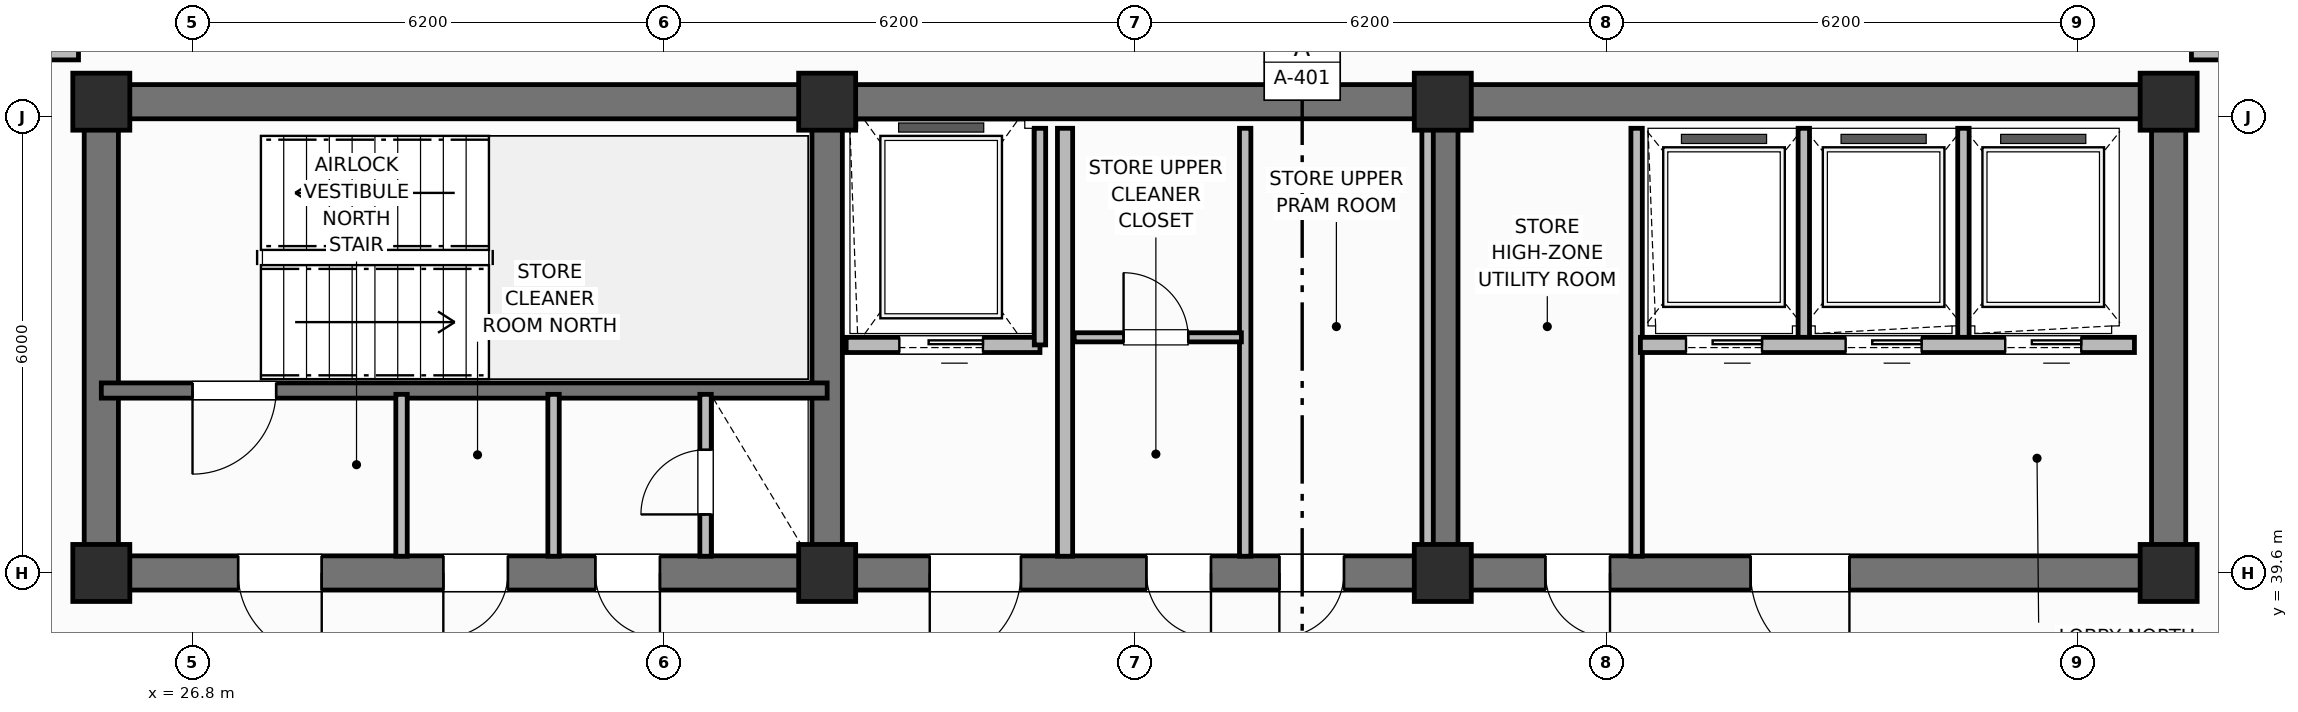
"""IFC4 building model, lengths in metres.
Left out: names, types, materials, properties, quantities, classifications, styles, units other than length and angle.
Written with IfcOpenShell. Run it as: python <this file> out.ifc"""

import sys

from ifc_helpers import new_model, si_unit, direction, frame, frame_2d, origin, origin_2d, place, context, subcontext, project, spatial, rectangle, extrude, element, fill, save


model = new_model("IFC4")
c1 = context("Model", 3, precision=1e-05, world=origin(), true_north=direction((0.0, 1.0)))
c2 = subcontext(c1, "Body", "Model", "MODEL_VIEW")
j1 = project(units=[si_unit("LENGTHUNIT", "METRE"), si_unit("PLANEANGLEUNIT", "RADIAN")], contexts=[c1])
p1 = place(None, origin())
s1 = spatial("IfcSite", under=j1, at=p1, CompositionType="ELEMENT")
p2 = place(p1, origin())
s2 = spatial("IfcBuilding", under=s1, at=p2, CompositionType="ELEMENT")
p3 = place(p2, frame((0.0, 0.0, 271.3)))
s3 = spatial("IfcBuildingStorey", under=s2, at=p3, CompositionType="ELEMENT", Elevation=271.3)
p4 = place(p3, frame((25.6, 45.8, 0.0), z_axis=(0.0, 0.0, 1.0), x_axis=(1.0, 0.0, 0.0)))
e1 = element("IfcWall", 1, at=p4, inside=s3, PredefinedType="SHEAR", context=c2, shape_type="SweptSolid", body=[
    extrude(rectangle(XDim=27.2, YDim=0.45, at=frame_2d((13.6, 0.0))), origin(), (0.0, 0.0, 1.0), 3.7),
])
for number, where, z_axis, x_axis in (
    (2, (25.6, 39.825, 0.0), (0.0, 0.0, 1.0), (0.0, 1.0, 0.0)),
    (3, (52.8, 39.825, 0.0), (0.0, 0.0, 1.0), (0.0, 1.0, 0.0)),
):
    element("IfcWall", number, at=place(p3, frame(where, z_axis=z_axis, x_axis=x_axis)), inside=s3, PredefinedType="SHEAR", context=c2, shape_type="SweptSolid", body=[
        extrude(rectangle(XDim=5.75, YDim=0.45, at=frame_2d((2.875, 0.0))), origin(), (0.0, 0.0, 1.0), 3.7),
    ])
p5 = place(p3, frame((52.8, 39.6, 0.0), z_axis=(0.0, 0.0, 1.0), x_axis=(-1.0, 0.0, 0.0)))
e4 = element("IfcWall", 4, at=p5, inside=s3, PredefinedType="SHEAR", context=c2, shape_type="SweptSolid", body=[
    extrude(rectangle(XDim=27.2, YDim=0.45, at=frame_2d((13.6, 0.0))), origin(), (0.0, 0.0, 1.0), 3.7),
])
p6 = place(p5, frame((24.3, 0.0, 0.0)))
e5 = element("IfcOpeningElement", 5, at=p6, cuts=e4, PredefinedType="OPENING", context=c2, shape_type="SweptSolid", body=[
    extrude(rectangle(XDim=1.1, YDim=2.15, at=frame_2d((0.55, 1.075))), frame((0.0, 0.235, 0.0), z_axis=(0.0, -1.0, 0.0), x_axis=(1.0, 0.0, 0.0)), (0.0, 0.0, 1.0), 0.47),
])
p7 = place(p5, frame((21.85, 0.0, 0.0)))
e6 = element("IfcOpeningElement", 6, at=p7, cuts=e4, PredefinedType="OPENING", context=c2, shape_type="SweptSolid", body=[
    extrude(rectangle(XDim=0.85, YDim=2.1, at=frame_2d((0.425, 1.05))), frame((0.0, 0.235, 0.0), z_axis=(0.0, -1.0, 0.0), x_axis=(1.0, 0.0, 0.0)), (0.0, 0.0, 1.0), 0.47),
])
p8 = place(p5, frame((19.85, 0.0, 0.0)))
e7 = element("IfcOpeningElement", 7, at=p8, cuts=e4, PredefinedType="OPENING", context=c2, shape_type="SweptSolid", body=[
    extrude(rectangle(XDim=0.85, YDim=2.1, at=frame_2d((0.425, 1.05))), frame((0.0, 0.235, 0.0), z_axis=(0.0, -1.0, 0.0), x_axis=(1.0, 0.0, 0.0)), (0.0, 0.0, 1.0), 0.47),
])
p9 = place(p5, frame((15.1, 0.0, 0.0)))
e8 = element("IfcOpeningElement", 8, at=p9, cuts=e4, PredefinedType="OPENING", context=c2, shape_type="SweptSolid", body=[
    extrude(rectangle(XDim=1.2, YDim=2.15, at=frame_2d((0.6, 1.075))), frame((0.0, 0.235, 0.0), z_axis=(0.0, -1.0, 0.0), x_axis=(1.0, 0.0, 0.0)), (0.0, 0.0, 1.0), 0.47),
])
p10 = place(p5, frame((12.6, 0.0, 0.0)))
e9 = element("IfcOpeningElement", 9, at=p10, cuts=e4, PredefinedType="OPENING", context=c2, shape_type="SweptSolid", body=[
    extrude(rectangle(XDim=0.85, YDim=2.1, at=frame_2d((0.425, 1.05))), frame((0.0, 0.235, 0.0), z_axis=(0.0, -1.0, 0.0), x_axis=(1.0, 0.0, 0.0)), (0.0, 0.0, 1.0), 0.47),
])
p11 = place(p5, frame((10.85, 0.0, 0.0)))
e10 = element("IfcOpeningElement", 10, at=p11, cuts=e4, PredefinedType="OPENING", context=c2, shape_type="SweptSolid", body=[
    extrude(rectangle(XDim=0.85, YDim=2.1, at=frame_2d((0.425, 1.05))), frame((0.0, 0.235, 0.0), z_axis=(0.0, -1.0, 0.0), x_axis=(1.0, 0.0, 0.0)), (0.0, 0.0, 1.0), 0.47),
])
p12 = place(p5, frame((7.35, 0.0, 0.0)))
e11 = element("IfcOpeningElement", 11, at=p12, cuts=e4, PredefinedType="OPENING", context=c2, shape_type="SweptSolid", body=[
    extrude(rectangle(XDim=0.85, YDim=2.1, at=frame_2d((0.425, 1.05))), frame((0.0, 0.235, 0.0), z_axis=(0.0, -1.0, 0.0), x_axis=(1.0, 0.0, 0.0)), (0.0, 0.0, 1.0), 0.47),
])
p13 = place(p5, frame((4.2, 0.0, 0.0)))
e12 = element("IfcOpeningElement", 12, at=p13, cuts=e4, PredefinedType="OPENING", context=c2, shape_type="SweptSolid", body=[
    extrude(rectangle(XDim=1.3, YDim=2.2, at=frame_2d((0.65, 1.1))), frame((0.0, 0.235, 0.0), z_axis=(0.0, -1.0, 0.0), x_axis=(1.0, 0.0, 0.0)), (0.0, 0.0, 1.0), 0.47),
])
for number, where, z_axis, x_axis in (
    (13, (35.15, 39.825, 0.0), (0.0, 0.0, 1.0), (0.0, 1.0, 0.0)),
    (14, (43.25, 39.825, 0.0), (0.0, 0.0, 1.0), (0.0, 1.0, 0.0)),
):
    element("IfcWall", number, at=place(p3, frame(where, z_axis=z_axis, x_axis=x_axis)), inside=s3, PredefinedType="SHEAR", context=c2, shape_type="SweptSolid", body=[
        extrude(rectangle(XDim=5.75, YDim=0.4, at=frame_2d((2.875, 0.0))), origin(), (0.0, 0.0, 1.0), 3.7),
    ])
for number, where, z_axis, x_axis in (
    (15, (25.6, 39.6, 0.0), (0.0, 0.0, 1.0), (1.0, 0.0, 0.0)),
    (16, (25.6, 45.8, 0.0), (0.0, 0.0, 1.0), (1.0, 0.0, 0.0)),
    (17, (35.15, 39.6, 0.0), (0.0, 0.0, 1.0), (1.0, 0.0, 0.0)),
    (18, (35.15, 45.8, 0.0), (0.0, 0.0, 1.0), (1.0, 0.0, 0.0)),
    (19, (43.25, 39.6, 0.0), (0.0, 0.0, 1.0), (1.0, 0.0, 0.0)),
    (20, (43.25, 45.8, 0.0), (0.0, 0.0, 1.0), (1.0, 0.0, 0.0)),
    (21, (52.8, 39.6, 0.0), (0.0, 0.0, 1.0), (1.0, 0.0, 0.0)),
    (22, (52.8, 45.8, 0.0), (0.0, 0.0, 1.0), (1.0, 0.0, 0.0)),
):
    element("IfcColumn", number, at=place(p3, frame(where, z_axis=z_axis, x_axis=x_axis)), inside=s3, PredefinedType="COLUMN", context=c2, shape_type="SweptSolid", body=[
        extrude(rectangle(XDim=0.75, YDim=0.75, at=origin_2d()), origin(), (0.0, 0.0, 1.0), 3.7),
    ])
p14 = place(p3, frame((35.15, 42.0, 0.0), z_axis=(0.0, 0.0, 1.0), x_axis=(-1.0, 0.0, 0.0)))
e23 = element("IfcWall", 23, at=p14, inside=s3, PredefinedType="SHEAR", context=c2, shape_type="SweptSolid", body=[
    extrude(rectangle(XDim=9.55, YDim=0.2, at=frame_2d((4.775, 0.0))), origin(), (0.0, 0.0, 1.0), 3.7),
])
p15 = place(p14, frame((7.25, 0.0, 0.0)))
e24 = element("IfcOpeningElement", 24, at=p15, cuts=e23, PredefinedType="OPENING", context=c2, shape_type="SweptSolid", body=[
    extrude(rectangle(XDim=1.1, YDim=2.15, at=frame_2d((0.55, 1.075))), frame((0.0, 0.11, 0.0), z_axis=(0.0, -1.0, 0.0), x_axis=(1.0, 0.0, 0.0)), (0.0, 0.0, 1.0), 0.22),
])
p16 = place(p3, frame((33.55, 39.82, 0.0), z_axis=(0.0, 0.0, 1.0), x_axis=(0.0, 1.0, 0.0)))
e25 = element("IfcWall", 25, at=p16, inside=s3, PredefinedType="PARTITIONING", context=c2, shape_type="SweptSolid", body=[
    extrude(rectangle(XDim=2.13, YDim=0.15, at=frame_2d((1.065, 0.0))), origin(), (0.0, 0.0, 1.0), 2.56),
])
p17 = place(p16, frame((0.55, 0.0, 0.0)))
e26 = element("IfcOpeningElement", 26, at=p17, cuts=e25, PredefinedType="OPENING", context=c2, shape_type="SweptSolid", body=[
    extrude(rectangle(XDim=0.85, YDim=2.05, at=frame_2d((0.425, 1.025))), frame((0.0, 0.085, 0.0), z_axis=(0.0, -1.0, 0.0), x_axis=(1.0, 0.0, 0.0)), (0.0, 0.0, 1.0), 0.17),
])
for number, where, z_axis, x_axis in (
    (27, (29.55, 39.82, 0.0), (0.0, 0.0, 1.0), (0.0, 1.0, 0.0)),
    (28, (31.55, 39.82, 0.0), (0.0, 0.0, 1.0), (0.0, 1.0, 0.0)),
):
    element("IfcWall", number, at=place(p3, frame(where, z_axis=z_axis, x_axis=x_axis)), inside=s3, PredefinedType="PARTITIONING", context=c2, shape_type="SweptSolid", body=[
        extrude(rectangle(XDim=2.13, YDim=0.15, at=frame_2d((1.065, 0.0))), origin(), (0.0, 0.0, 1.0), 2.56),
    ])
p18 = place(p3, frame((37.95, 42.6, 0.0), z_axis=(0.0, 0.0, 1.0), x_axis=(-1.0, 0.0, 0.0)))
e29 = element("IfcWall", 29, at=p18, inside=s3, PredefinedType="PARTITIONING", context=c2, shape_type="SweptSolid", body=[
    extrude(rectangle(XDim=2.55, YDim=0.2, at=frame_2d((1.275, 0.0))), origin(), (0.0, 0.0, 1.0), 2.33),
])
p19 = place(p18, frame((0.75, 0.0, 0.0)))
e30 = element("IfcOpeningElement", 30, at=p19, cuts=e29, PredefinedType="OPENING", context=c2, shape_type="SweptSolid", body=[
    extrude(rectangle(XDim=1.1, YDim=2.15, at=frame_2d((0.55, 1.075))), frame((0.0, 0.11, 0.0), z_axis=(0.0, -1.0, 0.0), x_axis=(1.0, 0.0, 0.0)), (0.0, 0.0, 1.0), 0.22),
])
p20 = place(p3, frame((37.95, 42.6, 0.0), z_axis=(0.0, 0.0, 1.0), x_axis=(0.0, 1.0, 0.0)))
e31 = element("IfcWall", 31, at=p20, inside=s3, PredefinedType="PARTITIONING", context=c2, shape_type="SweptSolid", body=[
    extrude(rectangle(XDim=2.85, YDim=0.15, at=frame_2d((1.425, 0.0))), origin(), (0.0, 0.0, 1.0), 2.56),
])
p21 = place(p3, frame((38.28, 39.82, 0.0), z_axis=(0.0, 0.0, 1.0), x_axis=(0.0, 1.0, 0.0)))
e32 = element("IfcWall", 32, at=p21, inside=s3, PredefinedType="PARTITIONING", context=c2, shape_type="SweptSolid", body=[
    extrude(rectangle(XDim=5.63, YDim=0.2, at=frame_2d((2.815, 0.0))), origin(), (0.0, 0.0, 1.0), 2.56),
])
for number, where, z_axis, x_axis in (
    (33, (43.05, 39.82, 0.0), (0.0, 0.0, 1.0), (0.0, 1.0, 0.0)),
    (34, (40.65, 39.82, 0.0), (0.0, 0.0, 1.0), (0.0, 1.0, 0.0)),
):
    element("IfcWall", number, at=place(p3, frame(where, z_axis=z_axis, x_axis=x_axis)), inside=s3, PredefinedType="PARTITIONING", context=c2, shape_type="SweptSolid", body=[
        extrude(rectangle(XDim=5.63, YDim=0.15, at=frame_2d((2.815, 0.0))), origin(), (0.0, 0.0, 1.0), 2.56),
    ])
p22 = place(p3, frame((38.4, 42.7, 0.0), z_axis=(0.0, 0.0, 1.0), x_axis=(1.0, 0.0, 0.0)))
e35 = element("IfcWall", 35, at=p22, inside=s3, PredefinedType="PARTITIONING", context=c2, shape_type="SweptSolid", body=[
    extrude(rectangle(XDim=2.2, YDim=0.12, at=frame_2d((1.1, 0.0))), origin(), (0.0, 0.0, 1.0), 2.33),
])
p23 = place(p22, frame((0.65, 0.0, 0.0)))
e36 = element("IfcOpeningElement", 36, at=p23, cuts=e35, PredefinedType="OPENING", context=c2, shape_type="SweptSolid", body=[
    extrude(rectangle(XDim=0.85, YDim=2.1, at=frame_2d((0.425, 1.05))), frame((0.0, 0.07, 0.0), z_axis=(0.0, -1.0, 0.0), x_axis=(1.0, 0.0, 0.0)), (0.0, 0.0, 1.0), 0.14),
])
p24 = place(p3, frame((45.8, 39.82, 0.0), z_axis=(0.0, 0.0, 1.0), x_axis=(0.0, 1.0, 0.0)))
e37 = element("IfcWall", 37, at=p24, inside=s3, PredefinedType="PARTITIONING", context=c2, shape_type="SweptSolid", body=[
    extrude(rectangle(XDim=5.63, YDim=0.15, at=frame_2d((2.815, 0.0))), origin(), (0.0, 0.0, 1.0), 2.56),
])
for number, where, z_axis, x_axis in (
    (38, (48.0, 42.65, 0.0), (0.0, 0.0, 1.0), (0.0, 1.0, 0.0)),
    (39, (50.1, 42.65, 0.0), (0.0, 0.0, 1.0), (0.0, 1.0, 0.0)),
):
    element("IfcWall", number, at=place(p3, frame(where, z_axis=z_axis, x_axis=x_axis)), inside=s3, PredefinedType="PARTITIONING", context=c2, shape_type="SweptSolid", body=[
        extrude(rectangle(XDim=2.8, YDim=0.15, at=frame_2d((1.4, 0.0))), origin(), (0.0, 0.0, 1.0), 2.56),
    ])
p25 = place(p3, frame((52.35, 42.6, 0.0), z_axis=(0.0, 0.0, 1.0), x_axis=(-1.0, 0.0, 0.0)))
e40 = element("IfcWall", 40, at=p25, inside=s3, PredefinedType="PARTITIONING", context=c2, shape_type="SweptSolid", body=[
    extrude(rectangle(XDim=6.5, YDim=0.2, at=frame_2d((3.25, 0.0))), origin(), (0.0, 0.0, 1.0), 2.56),
])
p26 = place(p25, frame((4.9, 0.0, 0.0)))
e41 = element("IfcOpeningElement", 41, at=p26, cuts=e40, PredefinedType="OPENING", context=c2, shape_type="SweptSolid", body=[
    extrude(rectangle(XDim=1.0, YDim=2.15, at=frame_2d((0.5, 1.075))), frame((0.0, 0.11, 0.0), z_axis=(0.0, -1.0, 0.0), x_axis=(1.0, 0.0, 0.0)), (0.0, 0.0, 1.0), 0.22),
])
p27 = place(p25, frame((2.8, 0.0, 0.0)))
e42 = element("IfcOpeningElement", 42, at=p27, cuts=e40, PredefinedType="OPENING", context=c2, shape_type="SweptSolid", body=[
    extrude(rectangle(XDim=1.0, YDim=2.15, at=frame_2d((0.5, 1.075))), frame((0.0, 0.11, 0.0), z_axis=(0.0, -1.0, 0.0), x_axis=(1.0, 0.0, 0.0)), (0.0, 0.0, 1.0), 0.22),
])
p28 = place(p25, frame((0.7, 0.0, 0.0)))
e43 = element("IfcOpeningElement", 43, at=p28, cuts=e40, PredefinedType="OPENING", context=c2, shape_type="SweptSolid", body=[
    extrude(rectangle(XDim=1.0, YDim=2.15, at=frame_2d((0.5, 1.075))), frame((0.0, 0.11, 0.0), z_axis=(0.0, -1.0, 0.0), x_axis=(1.0, 0.0, 0.0)), (0.0, 0.0, 1.0), 0.22),
])
p29 = place(p3, frame((21.546, 46.45, 0.0), z_axis=(0.0, 0.0, 1.0), x_axis=(1.0, 0.0, 0.0)))
e44 = element("IfcWall", 44, at=p29, inside=s3, PredefinedType="PARTITIONING", context=c2, shape_type="SweptSolid", body=[
    extrude(rectangle(XDim=3.754, YDim=0.2, at=frame_2d((1.877, 0.0))), origin(), (0.0, 0.0, 1.0), 2.56),
])
p30 = place(p3, frame((53.1, 46.45, 0.0), z_axis=(0.0, 0.0, 1.0), x_axis=(1.0, 0.0, 0.0)))
e45 = element("IfcWall", 45, at=p30, inside=s3, PredefinedType="PARTITIONING", context=c2, shape_type="SweptSolid", body=[
    extrude(rectangle(XDim=3.754, YDim=0.2, at=frame_2d((1.877, 0.0))), origin(), (0.0, 0.0, 1.0), 2.56),
])
p31 = place(p15, origin())
e46 = element("IfcDoor", 46, at=p31, inside=s3, OperationType="SINGLE_SWING_RIGHT", PredefinedType="DOOR", context=c2, shape_type="SweptSolid", body=[
    extrude(rectangle(XDim=1.1, YDim=2.15, at=frame_2d((0.55, 1.075))), frame((0.0, 0.025, 0.0), z_axis=(0.0, -1.0, 0.0), x_axis=(1.0, 0.0, 0.0)), (0.0, 0.0, 1.0), 0.05),
])
fill(e24, e46)
p32 = place(p17, origin())
e47 = element("IfcDoor", 47, at=p32, inside=s3, OperationType="SINGLE_SWING_LEFT", PredefinedType="TRAPDOOR", context=c2, shape_type="SweptSolid", body=[
    extrude(rectangle(XDim=0.85, YDim=2.05, at=frame_2d((0.425, 1.025))), frame((0.0, 0.025, 0.0), z_axis=(0.0, -1.0, 0.0), x_axis=(1.0, 0.0, 0.0)), (0.0, 0.0, 1.0), 0.05),
])
fill(e26, e47)
p33 = place(p19, origin())
e48 = element("IfcDoor", 48, at=p33, inside=s3, OperationType="SLIDING_TO_LEFT", PredefinedType="DOOR", context=c2, shape_type="SweptSolid", body=[
    extrude(rectangle(XDim=1.1, YDim=2.15, at=frame_2d((0.55, 1.075))), frame((0.0, 0.025, 0.0), z_axis=(0.0, -1.0, 0.0), x_axis=(1.0, 0.0, 0.0)), (0.0, 0.0, 1.0), 0.05),
])
fill(e30, e48)
p34 = place(p23, origin())
e49 = element("IfcDoor", 49, at=p34, inside=s3, OperationType="SINGLE_SWING_LEFT", PredefinedType="DOOR", context=c2, shape_type="SweptSolid", body=[
    extrude(rectangle(XDim=0.85, YDim=2.1, at=frame_2d((0.425, 1.05))), frame((0.0, 0.025, 0.0), z_axis=(0.0, -1.0, 0.0), x_axis=(1.0, 0.0, 0.0)), (0.0, 0.0, 1.0), 0.05),
])
fill(e36, e49)
p35 = place(p26, origin())
e50 = element("IfcDoor", 50, at=p35, inside=s3, OperationType="SLIDING_TO_LEFT", PredefinedType="DOOR", context=c2, shape_type="SweptSolid", body=[
    extrude(rectangle(XDim=1.0, YDim=2.15, at=frame_2d((0.5, 1.075))), frame((0.0, 0.025, 0.0), z_axis=(0.0, -1.0, 0.0), x_axis=(1.0, 0.0, 0.0)), (0.0, 0.0, 1.0), 0.05),
])
fill(e41, e50)
p36 = place(p27, origin())
e51 = element("IfcDoor", 51, at=p36, inside=s3, OperationType="SLIDING_TO_LEFT", PredefinedType="DOOR", context=c2, shape_type="SweptSolid", body=[
    extrude(rectangle(XDim=1.0, YDim=2.15, at=frame_2d((0.5, 1.075))), frame((0.0, 0.025, 0.0), z_axis=(0.0, -1.0, 0.0), x_axis=(1.0, 0.0, 0.0)), (0.0, 0.0, 1.0), 0.05),
])
fill(e42, e51)
p37 = place(p28, origin())
e52 = element("IfcDoor", 52, at=p37, inside=s3, OperationType="SLIDING_TO_LEFT", PredefinedType="DOOR", context=c2, shape_type="SweptSolid", body=[
    extrude(rectangle(XDim=1.0, YDim=2.15, at=frame_2d((0.5, 1.075))), frame((0.0, 0.025, 0.0), z_axis=(0.0, -1.0, 0.0), x_axis=(1.0, 0.0, 0.0)), (0.0, 0.0, 1.0), 0.05),
])
fill(e43, e52)
p38 = place(p6, origin())
e53 = element("IfcDoor", 53, at=p38, inside=s3, OperationType="SINGLE_SWING_LEFT", PredefinedType="DOOR", context=c2, shape_type="SweptSolid", body=[
    extrude(rectangle(XDim=1.1, YDim=2.15, at=frame_2d((0.55, 1.075))), frame((0.0, 0.025, 0.0), z_axis=(0.0, -1.0, 0.0), x_axis=(1.0, 0.0, 0.0)), (0.0, 0.0, 1.0), 0.05),
])
fill(e5, e53)
p39 = place(p7, origin())
e54 = element("IfcDoor", 54, at=p39, inside=s3, OperationType="SINGLE_SWING_RIGHT", PredefinedType="DOOR", context=c2, shape_type="SweptSolid", body=[
    extrude(rectangle(XDim=0.85, YDim=2.1, at=frame_2d((0.425, 1.05))), frame((0.0, 0.025, 0.0), z_axis=(0.0, -1.0, 0.0), x_axis=(1.0, 0.0, 0.0)), (0.0, 0.0, 1.0), 0.05),
])
fill(e6, e54)
p40 = place(p8, origin())
e55 = element("IfcDoor", 55, at=p40, inside=s3, OperationType="SINGLE_SWING_LEFT", PredefinedType="DOOR", context=c2, shape_type="SweptSolid", body=[
    extrude(rectangle(XDim=0.85, YDim=2.1, at=frame_2d((0.425, 1.05))), frame((0.0, 0.025, 0.0), z_axis=(0.0, -1.0, 0.0), x_axis=(1.0, 0.0, 0.0)), (0.0, 0.0, 1.0), 0.05),
])
fill(e7, e55)
p41 = place(p9, origin())
e56 = element("IfcDoor", 56, at=p41, inside=s3, OperationType="SINGLE_SWING_RIGHT", PredefinedType="DOOR", context=c2, shape_type="SweptSolid", body=[
    extrude(rectangle(XDim=1.2, YDim=2.15, at=frame_2d((0.6, 1.075))), frame((0.0, 0.025, 0.0), z_axis=(0.0, -1.0, 0.0), x_axis=(1.0, 0.0, 0.0)), (0.0, 0.0, 1.0), 0.05),
])
fill(e8, e56)
p42 = place(p10, origin())
e57 = element("IfcDoor", 57, at=p42, inside=s3, OperationType="SINGLE_SWING_LEFT", PredefinedType="DOOR", context=c2, shape_type="SweptSolid", body=[
    extrude(rectangle(XDim=0.85, YDim=2.1, at=frame_2d((0.425, 1.05))), frame((0.0, 0.025, 0.0), z_axis=(0.0, -1.0, 0.0), x_axis=(1.0, 0.0, 0.0)), (0.0, 0.0, 1.0), 0.05),
])
fill(e9, e57)
p43 = place(p11, origin())
e58 = element("IfcDoor", 58, at=p43, inside=s3, OperationType="SINGLE_SWING_RIGHT", PredefinedType="DOOR", context=c2, shape_type="SweptSolid", body=[
    extrude(rectangle(XDim=0.85, YDim=2.1, at=frame_2d((0.425, 1.05))), frame((0.0, 0.025, 0.0), z_axis=(0.0, -1.0, 0.0), x_axis=(1.0, 0.0, 0.0)), (0.0, 0.0, 1.0), 0.05),
])
fill(e10, e58)
p44 = place(p12, origin())
e59 = element("IfcDoor", 59, at=p44, inside=s3, OperationType="SINGLE_SWING_LEFT", PredefinedType="DOOR", context=c2, shape_type="SweptSolid", body=[
    extrude(rectangle(XDim=0.85, YDim=2.1, at=frame_2d((0.425, 1.05))), frame((0.0, 0.025, 0.0), z_axis=(0.0, -1.0, 0.0), x_axis=(1.0, 0.0, 0.0)), (0.0, 0.0, 1.0), 0.05),
])
fill(e11, e59)
p45 = place(p13, origin())
e60 = element("IfcDoor", 60, at=p45, inside=s3, OperationType="SINGLE_SWING_LEFT", PredefinedType="DOOR", context=c2, shape_type="SweptSolid", body=[
    extrude(rectangle(XDim=1.3, YDim=2.2, at=frame_2d((0.65, 1.1))), frame((0.0, 0.025, 0.0), z_axis=(0.0, -1.0, 0.0), x_axis=(1.0, 0.0, 0.0)), (0.0, 0.0, 1.0), 0.05),
])
fill(e12, e60)
save(model, sys.argv[1])
